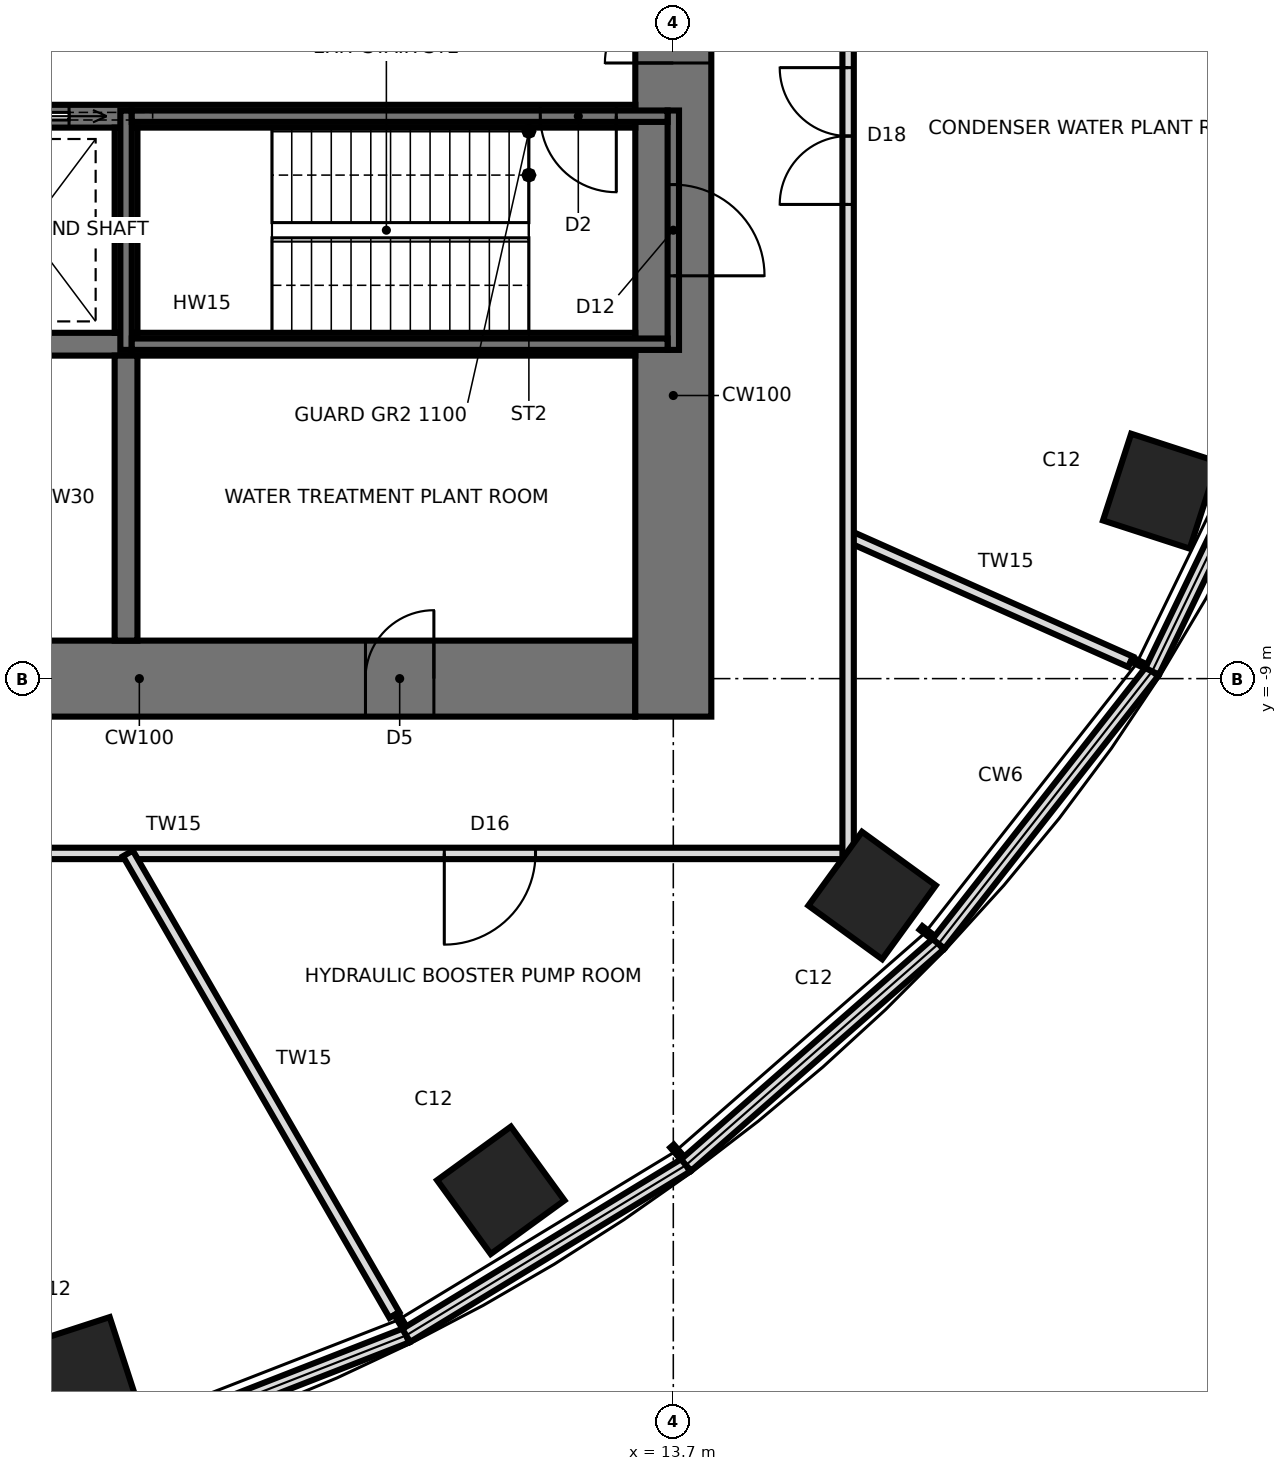
"""IFC4 building model, lengths in metres.
Left out: names, types, materials, properties, quantities, classifications, styles, units other than length and angle.
Written with IfcOpenShell. Run it as: python <this file> out.ifc"""

import sys

from ifc_helpers import new_model, si_unit, direction, frame, frame_2d, origin, origin_2d, place, context, subcontext, project, spatial, rectangle, extrude, element, fill, save


model = new_model("IFC4")
c1 = context("Model", 3, precision=1e-05, world=origin(), true_north=direction((0.0, 1.0)))
c2 = subcontext(c1, "Body", "Model", "MODEL_VIEW")
j1 = project(units=[si_unit("LENGTHUNIT", "METRE"), si_unit("PLANEANGLEUNIT", "RADIAN")], contexts=[c1])
p1 = place(None, origin())
s1 = spatial("IfcSite", under=j1, at=p1, CompositionType="ELEMENT")
p2 = place(p1, origin())
s2 = spatial("IfcBuilding", under=s1, at=p2, CompositionType="ELEMENT")
p3 = place(p2, frame((0.0, 0.0, 277.0)))
s3 = spatial("IfcBuildingStorey", under=s2, at=p3, CompositionType="ELEMENT", Elevation=277.0)
for number, where, z_axis, x_axis in (
    (1, (5.9, -18.157, 0.0), (0.0, 0.0, 1.0), (0.309, -0.951, 0.0)),
    (2, (11.43, -15.733, 0.0), (0.0, 0.0, 1.0), (0.588, -0.809, 0.0)),
    (3, (16.315, -11.854, 0.0), (0.0, 0.0, 1.0), (0.809, -0.588, 0.0)),
    (4, (20.109, -6.534, 0.0), (0.0, 0.0, 1.0), (0.951, -0.309, 0.0)),
):
    element("IfcColumn", number, at=place(p3, frame(where, z_axis=z_axis, x_axis=x_axis)), inside=s3, PredefinedType="COLUMN", context=c2, shape_type="SweptSolid", body=[
        extrude(rectangle(XDim=1.2, YDim=1.2, at=origin_2d()), origin(), (0.0, 0.0, 1.0), 5.0),
    ])
p4 = place(p3, frame((-13.2, -9.0, 0.0), z_axis=(0.0, 0.0, 1.0), x_axis=(1.0, 0.0, 0.0)))
e5 = element("IfcWall", 5, at=p4, inside=s3, PredefinedType="SHEAR", context=c2, shape_type="SweptSolid", body=[
    extrude(rectangle(XDim=26.4, YDim=1.0, at=frame_2d((13.2, 0.0))), origin(), (0.0, 0.0, 1.0), 5.0),
])
p5 = place(p4, frame((2.65, 0.0, 0.0)))
e6 = element("IfcOpeningElement", 6, at=p5, cuts=e5, PredefinedType="OPENING", context=c2, shape_type="SweptSolid", body=[
    extrude(rectangle(XDim=0.9, YDim=2.1, at=frame_2d((0.45, 1.05))), frame((0.0, 0.51, 0.0), z_axis=(0.0, -1.0, 0.0), x_axis=(1.0, 0.0, 0.0)), (0.0, 0.0, 1.0), 1.02),
])
p6 = place(p4, frame((9.5, 0.0, 0.0)))
e7 = element("IfcOpeningElement", 7, at=p6, cuts=e5, PredefinedType="OPENING", context=c2, shape_type="SweptSolid", body=[
    extrude(rectangle(XDim=0.9, YDim=2.1, at=frame_2d((0.45, 1.05))), frame((0.0, 0.51, 0.0), z_axis=(0.0, -1.0, 0.0), x_axis=(1.0, 0.0, 0.0)), (0.0, 0.0, 1.0), 1.02),
])
p7 = place(p4, frame((16.0, 0.0, 0.0)))
e8 = element("IfcOpeningElement", 8, at=p7, cuts=e5, PredefinedType="OPENING", context=c2, shape_type="SweptSolid", body=[
    extrude(rectangle(XDim=0.9, YDim=2.1, at=frame_2d((0.45, 1.05))), frame((0.0, 0.51, 0.0), z_axis=(0.0, -1.0, 0.0), x_axis=(1.0, 0.0, 0.0)), (0.0, 0.0, 1.0), 1.02),
])
p8 = place(p4, frame((22.85, 0.0, 0.0)))
e9 = element("IfcOpeningElement", 9, at=p8, cuts=e5, PredefinedType="OPENING", context=c2, shape_type="SweptSolid", body=[
    extrude(rectangle(XDim=0.9, YDim=2.1, at=frame_2d((0.45, 1.05))), frame((0.0, 0.51, 0.0), z_axis=(0.0, -1.0, 0.0), x_axis=(1.0, 0.0, 0.0)), (0.0, 0.0, 1.0), 1.02),
])
p9 = place(p3, frame((13.7, -9.5, 0.0), z_axis=(0.0, 0.0, 1.0), x_axis=(0.0, 1.0, 0.0)))
e10 = element("IfcWall", 10, at=p9, inside=s3, PredefinedType="SHEAR", context=c2, shape_type="SweptSolid", body=[
    extrude(rectangle(XDim=19.0, YDim=1.0, at=frame_2d((9.5, 0.0))), origin(), (0.0, 0.0, 1.0), 5.0),
])
p10 = place(p9, frame((8.6, 0.0, 0.0)))
e11 = element("IfcOpeningElement", 11, at=p10, cuts=e10, PredefinedType="OPENING", context=c2, shape_type="SweptSolid", body=[
    extrude(rectangle(XDim=1.8, YDim=2.4, at=frame_2d((0.9, 1.2))), frame((0.0, 0.51, 0.0), z_axis=(0.0, -1.0, 0.0), x_axis=(1.0, 0.0, 0.0)), (0.0, 0.0, 1.0), 1.02),
])
p11 = place(p3, frame((-13.2, -1.6, 0.0), z_axis=(0.0, 0.0, 1.0), x_axis=(1.0, 0.0, 0.0)))
e12 = element("IfcWall", 12, at=p11, inside=s3, PredefinedType="SHEAR", context=c2, shape_type="SweptSolid", body=[
    extrude(rectangle(XDim=26.4, YDim=0.3, at=frame_2d((13.2, 0.0))), origin(), (0.0, 0.0, 1.0), 5.0),
])
p12 = place(p11, frame((25.15, 0.0, 0.0)))
e13 = element("IfcOpeningElement", 13, at=p12, cuts=e12, PredefinedType="OPENING", context=c2, shape_type="SweptSolid", body=[
    extrude(rectangle(XDim=1.0, YDim=2.1, at=frame_2d((0.5, 1.05))), frame((0.0, 0.16, 0.0), z_axis=(0.0, -1.0, 0.0), x_axis=(1.0, 0.0, 0.0)), (0.0, 0.0, 1.0), 0.32),
])
p13 = place(p11, frame((7.55, 0.0, 0.0)))
e14 = element("IfcOpeningElement", 14, at=p13, cuts=e12, PredefinedType="OPENING", context=c2, shape_type="SweptSolid", body=[
    extrude(rectangle(XDim=0.9, YDim=2.1, at=frame_2d((0.45, 1.05))), frame((0.0, 0.16, 0.0), z_axis=(0.0, -1.0, 0.0), x_axis=(1.0, 0.0, 0.0)), (0.0, 0.0, 1.0), 0.32),
])
p14 = place(p11, frame((10.15, 0.0, 0.0)))
e15 = element("IfcOpeningElement", 15, at=p14, cuts=e12, PredefinedType="OPENING", context=c2, shape_type="SweptSolid", body=[
    extrude(rectangle(XDim=0.9, YDim=2.1, at=frame_2d((0.45, 1.05))), frame((0.0, 0.16, 0.0), z_axis=(0.0, -1.0, 0.0), x_axis=(1.0, 0.0, 0.0)), (0.0, 0.0, 1.0), 0.32),
])
p15 = place(p11, frame((12.75, 0.0, 0.0)))
e16 = element("IfcOpeningElement", 16, at=p15, cuts=e12, PredefinedType="OPENING", context=c2, shape_type="SweptSolid", body=[
    extrude(rectangle(XDim=0.9, YDim=2.1, at=frame_2d((0.45, 1.05))), frame((0.0, 0.16, 0.0), z_axis=(0.0, -1.0, 0.0), x_axis=(1.0, 0.0, 0.0)), (0.0, 0.0, 1.0), 0.32),
])
p16 = place(p11, frame((15.25, 0.0, 0.0)))
e17 = element("IfcOpeningElement", 17, at=p16, cuts=e12, PredefinedType="OPENING", context=c2, shape_type="SweptSolid", body=[
    extrude(rectangle(XDim=1.1, YDim=2.3, at=frame_2d((0.55, 1.15))), frame((0.0, 0.16, 0.0), z_axis=(0.0, -1.0, 0.0), x_axis=(1.0, 0.0, 0.0)), (0.0, 0.0, 1.0), 0.32),
])
p17 = place(p11, frame((17.85, 0.0, 0.0)))
e18 = element("IfcOpeningElement", 18, at=p17, cuts=e12, PredefinedType="OPENING", context=c2, shape_type="SweptSolid", body=[
    extrude(rectangle(XDim=1.1, YDim=2.3, at=frame_2d((0.55, 1.15))), frame((0.0, 0.16, 0.0), z_axis=(0.0, -1.0, 0.0), x_axis=(1.0, 0.0, 0.0)), (0.0, 0.0, 1.0), 0.32),
])
p18 = place(p11, frame((5.55, 0.0, 0.0)))
e19 = element("IfcOpeningElement", 19, at=p18, cuts=e12, PredefinedType="OPENING", context=c2, shape_type="SweptSolid", body=[
    extrude(rectangle(XDim=0.9, YDim=2.1, at=frame_2d((0.45, 1.05))), frame((0.0, 0.16, 0.0), z_axis=(0.0, -1.0, 0.0), x_axis=(1.0, 0.0, 0.0)), (0.0, 0.0, 1.0), 0.32),
])
p19 = place(p3, frame((-13.2, -4.6, 0.0), z_axis=(0.0, 0.0, 1.0), x_axis=(1.0, 0.0, 0.0)))
e20 = element("IfcWall", 20, at=p19, inside=s3, PredefinedType="SHEAR", context=c2, shape_type="SweptSolid", body=[
    extrude(rectangle(XDim=26.4, YDim=0.3, at=frame_2d((13.2, 0.0))), origin(), (0.0, 0.0, 1.0), 5.0),
])
p20 = place(p3, frame((6.5, -1.75, 0.0), z_axis=(0.0, 0.0, 1.0), x_axis=(0.0, -1.0, 0.0)))
e21 = element("IfcWall", 21, at=p20, inside=s3, PredefinedType="SHEAR", context=c2, shape_type="SweptSolid", body=[
    extrude(rectangle(XDim=2.7, YDim=0.3, at=frame_2d((1.35, 0.0))), origin(), (0.0, 0.0, 1.0), 5.0),
])
p21 = place(p3, frame((6.5, -4.75, 0.0), z_axis=(0.0, 0.0, 1.0), x_axis=(0.0, -1.0, 0.0)))
e22 = element("IfcWall", 22, at=p21, inside=s3, PredefinedType="SHEAR", context=c2, shape_type="SweptSolid", body=[
    extrude(rectangle(XDim=3.75, YDim=0.3, at=frame_2d((1.875, 0.0))), origin(), (0.0, 0.0, 1.0), 5.0),
])
p22 = place(p3, frame((6.233, -19.184, 5.0), z_axis=(0.0, 0.0, 1.0), x_axis=(0.931602336342, 0.363479142348, 0.0)))
e23 = element("IfcWall", 23, at=p22, inside=s3, PredefinedType="PARAPET", context=c2, shape_type="SweptSolid", body=[
    extrude(rectangle(XDim=4.242, YDim=0.2, at=frame_2d((2.121, 0.0))), origin(), (0.0, 0.0, 1.0), 0.4),
])
p23 = place(p3, frame((10.186, -17.642, 5.0), z_axis=(0.0, 0.0, 1.0), x_axis=(0.854217149251, 0.519916398977, 0.0)))
e24 = element("IfcWall", 24, at=p23, inside=s3, PredefinedType="PARAPET", context=c2, shape_type="SweptSolid", body=[
    extrude(rectangle(XDim=4.31, YDim=0.2, at=frame_2d((2.155, 0.0))), origin(), (0.0, 0.0, 1.0), 0.4),
])
p24 = place(p3, frame((13.867, -15.401, 5.0), z_axis=(0.0, 0.0, 1.0), x_axis=(0.751898477354, 0.659278908925, 0.0)))
e25 = element("IfcWall", 25, at=p24, inside=s3, PredefinedType="PARAPET", context=c2, shape_type="SweptSolid", body=[
    extrude(rectangle(XDim=4.418, YDim=0.2, at=frame_2d((2.209, 0.0))), origin(), (0.0, 0.0, 1.0), 0.4),
])
p25 = place(p3, frame((17.189, -12.489, 5.0), z_axis=(0.0, 0.0, 1.0), x_axis=(0.617115858167, 0.786872300694, 0.0)))
e26 = element("IfcWall", 26, at=p25, inside=s3, PredefinedType="PARAPET", context=c2, shape_type="SweptSolid", body=[
    extrude(rectangle(XDim=4.555, YDim=0.2, at=frame_2d((2.277, 0.0))), origin(), (0.0, 0.0, 1.0), 0.4),
])
p26 = place(p3, frame((20.0, -8.905, 5.0), z_axis=(0.0, 0.0, 1.0), x_axis=(0.43525592316, 0.900306770692, 0.0)))
e27 = element("IfcWall", 27, at=p26, inside=s3, PredefinedType="PARAPET", context=c2, shape_type="SweptSolid", body=[
    extrude(rectangle(XDim=4.687, YDim=0.2, at=frame_2d((2.344, 0.0))), origin(), (0.0, 0.0, 1.0), 0.4),
])
p27 = place(p3, frame((-16.0, -11.3, 0.0), z_axis=(0.0, 0.0, 1.0), x_axis=(1.0, 0.0, 0.0)))
e28 = element("IfcWall", 28, at=p27, inside=s3, PredefinedType="PARTITIONING", context=c2, shape_type="SweptSolid", body=[
    extrude(rectangle(XDim=32.0, YDim=0.15, at=frame_2d((16.0, 0.0))), origin(), (0.0, 0.0, 1.0), 4.75),
])
p28 = place(p27, frame((2.313, 0.0, 0.0)))
e29 = element("IfcOpeningElement", 29, at=p28, cuts=e28, PredefinedType="OPENING", context=c2, shape_type="SweptSolid", body=[
    extrude(rectangle(XDim=1.2, YDim=2.1, at=frame_2d((0.6, 1.05))), frame((0.0, 0.085, 0.0), z_axis=(0.0, -1.0, 0.0), x_axis=(1.0, 0.0, 0.0)), (0.0, 0.0, 1.0), 0.17),
])
p29 = place(p27, frame((9.394, 0.0, 0.0)))
e30 = element("IfcOpeningElement", 30, at=p29, cuts=e28, PredefinedType="OPENING", context=c2, shape_type="SweptSolid", body=[
    extrude(rectangle(XDim=1.8, YDim=2.4, at=frame_2d((0.9, 1.2))), frame((0.0, 0.085, 0.0), z_axis=(0.0, -1.0, 0.0), x_axis=(1.0, 0.0, 0.0)), (0.0, 0.0, 1.0), 0.17),
])
p30 = place(p27, frame((17.768, 0.0, 0.0)))
e31 = element("IfcOpeningElement", 31, at=p30, cuts=e28, PredefinedType="OPENING", context=c2, shape_type="SweptSolid", body=[
    extrude(rectangle(XDim=1.8, YDim=2.4, at=frame_2d((0.9, 1.2))), frame((0.0, 0.085, 0.0), z_axis=(0.0, -1.0, 0.0), x_axis=(1.0, 0.0, 0.0)), (0.0, 0.0, 1.0), 0.17),
])
p31 = place(p27, frame((26.687, 0.0, 0.0)))
e32 = element("IfcOpeningElement", 32, at=p31, cuts=e28, PredefinedType="OPENING", context=c2, shape_type="SweptSolid", body=[
    extrude(rectangle(XDim=1.2, YDim=2.1, at=frame_2d((0.6, 1.05))), frame((0.0, 0.085, 0.0), z_axis=(0.0, -1.0, 0.0), x_axis=(1.0, 0.0, 0.0)), (0.0, 0.0, 1.0), 0.17),
])
p32 = place(p3, frame((6.524, -11.3, 0.0), z_axis=(0.0, 0.0, 1.0), x_axis=(0.4999806097, -0.86603659849, 0.0)))
e33 = element("IfcWall", 33, at=p32, inside=s3, PredefinedType="PARTITIONING", context=c2, shape_type="SweptSolid", body=[
    extrude(rectangle(XDim=7.013, YDim=0.15, at=frame_2d((3.506, 0.0))), origin(), (0.0, 0.0, 1.0), 4.75),
])
p33 = place(p3, frame((16.0, -7.124, 0.0), z_axis=(0.0, 0.0, 1.0), x_axis=(0.91357135451, -0.406678472774, 0.0)))
e34 = element("IfcWall", 34, at=p33, inside=s3, PredefinedType="PARTITIONING", context=c2, shape_type="SweptSolid", body=[
    extrude(rectangle(XDim=4.068, YDim=0.15, at=frame_2d((2.034, 0.0))), origin(), (0.0, 0.0, 1.0), 4.75),
])
p34 = place(p3, frame((16.0, -11.3, 0.0), z_axis=(0.0, 0.0, 1.0), x_axis=(0.0, 1.0, 0.0)))
e35 = element("IfcWall", 35, at=p34, inside=s3, PredefinedType="PARTITIONING", context=c2, shape_type="SweptSolid", body=[
    extrude(rectangle(XDim=22.6, YDim=0.15, at=frame_2d((11.3, 0.0))), origin(), (0.0, 0.0, 1.0), 4.75),
])
p35 = place(p34, frame((8.539, 0.0, 0.0)))
e36 = element("IfcOpeningElement", 36, at=p35, cuts=e35, PredefinedType="OPENING", context=c2, shape_type="SweptSolid", body=[
    extrude(rectangle(XDim=1.8, YDim=2.4, at=frame_2d((0.9, 1.2))), frame((0.0, 0.085, 0.0), z_axis=(0.0, -1.0, 0.0), x_axis=(1.0, 0.0, 0.0)), (0.0, 0.0, 1.0), 0.17),
])
p36 = place(p3, frame((6.5, -4.675, 5.0), z_axis=(0.0, 0.0, 1.0), x_axis=(0.0, 1.0, 0.0)))
e37 = element("IfcWall", 37, at=p36, inside=s3, PredefinedType="SOLIDWALL", context=c2, shape_type="SweptSolid", body=[
    extrude(rectangle(XDim=3.15, YDim=0.15, at=frame_2d((1.575, 0.0))), origin(), (0.0, 0.0, 1.0), 2.82),
])
p37 = place(p3, frame((13.7, -4.675, 5.0), z_axis=(0.0, 0.0, 1.0), x_axis=(0.0, 1.0, 0.0)))
e38 = element("IfcWall", 38, at=p37, inside=s3, PredefinedType="SOLIDWALL", context=c2, shape_type="SweptSolid", body=[
    extrude(rectangle(XDim=3.15, YDim=0.15, at=frame_2d((1.575, 0.0))), origin(), (0.0, 0.0, 1.0), 2.82),
])
p38 = place(p37, frame((0.975, 0.0, 0.0)))
e39 = element("IfcOpeningElement", 39, at=p38, cuts=e38, PredefinedType="OPENING", context=c2, shape_type="SweptSolid", body=[
    extrude(rectangle(XDim=1.2, YDim=2.1, at=frame_2d((0.6, 1.05))), frame((0.0, 0.085, 0.0), z_axis=(0.0, -1.0, 0.0), x_axis=(1.0, 0.0, 0.0)), (0.0, 0.0, 1.0), 0.17),
])
p39 = place(p3, frame((6.575, -4.6, 5.0), z_axis=(0.0, 0.0, 1.0), x_axis=(1.0, 0.0, 0.0)))
e40 = element("IfcWall", 40, at=p39, inside=s3, PredefinedType="SOLIDWALL", context=c2, shape_type="SweptSolid", body=[
    extrude(rectangle(XDim=7.05, YDim=0.15, at=frame_2d((3.525, 0.0))), origin(), (0.0, 0.0, 1.0), 2.82),
])
p40 = place(p3, frame((6.575, -1.6, 5.0), z_axis=(0.0, 0.0, 1.0), x_axis=(1.0, 0.0, 0.0)))
e41 = element("IfcWall", 41, at=p40, inside=s3, PredefinedType="SOLIDWALL", context=c2, shape_type="SweptSolid", body=[
    extrude(rectangle(XDim=7.05, YDim=0.15, at=frame_2d((3.525, 0.0))), origin(), (0.0, 0.0, 1.0), 2.82),
])
p41 = place(p40, frame((0.5, 0.0, 1.9)))
e42 = element("IfcOpeningElement", 42, at=p41, cuts=e41, PredefinedType="OPENING", context=c2, shape_type="SweptSolid", body=[
    extrude(rectangle(XDim=0.9, YDim=0.6, at=frame_2d((0.45, 0.3))), frame((0.0, 0.085, 0.0), z_axis=(0.0, -1.0, 0.0), x_axis=(1.0, 0.0, 0.0)), (0.0, 0.0, 1.0), 0.17),
])
p42 = place(p10, origin())
e43 = element("IfcDoor", 43, at=p42, inside=s3, OperationType="DOUBLE_DOOR_SINGLE_SWING", PredefinedType="DOOR", context=c2, shape_type="SweptSolid", body=[
    extrude(rectangle(XDim=1.72, YDim=2.36, at=frame_2d((0.9, 1.18))), frame((0.0, 0.025, 0.0), z_axis=(0.0, -1.0, 0.0), x_axis=(1.0, 0.0, 0.0)), (0.0, 0.0, 1.0), 0.05),
    extrude(rectangle(XDim=0.04, YDim=2.4, at=frame_2d((0.02, 1.2))), frame((0.0, 0.25, 0.0), z_axis=(0.0, -1.0, 0.0), x_axis=(1.0, 0.0, 0.0)), (0.0, 0.0, 1.0), 0.5),
    extrude(rectangle(XDim=0.04, YDim=2.4, at=frame_2d((1.78, 1.2))), frame((0.0, 0.25, 0.0), z_axis=(0.0, -1.0, 0.0), x_axis=(1.0, 0.0, 0.0)), (0.0, 0.0, 1.0), 0.5),
    extrude(rectangle(XDim=1.72, YDim=0.04, at=frame_2d((0.9, 2.38))), frame((0.0, 0.25, 0.0), z_axis=(0.0, -1.0, 0.0), x_axis=(1.0, 0.0, 0.0)), (0.0, 0.0, 1.0), 0.5),
])
fill(e11, e43)
p43 = place(p12, frame((1.0, 0.0, 0.0), z_axis=(0.0, 0.0, 1.0), x_axis=(-1.0, 0.0, 0.0)))
e44 = element("IfcDoor", 44, at=p43, inside=s3, OperationType="SINGLE_SWING_LEFT", PredefinedType="DOOR", context=c2, shape_type="SweptSolid", body=[
    extrude(rectangle(XDim=1.0, YDim=2.1, at=frame_2d((0.5, 1.05))), frame((0.0, 0.025, 0.0), z_axis=(0.0, -1.0, 0.0), x_axis=(1.0, 0.0, 0.0)), (0.0, 0.0, 1.0), 0.05),
])
fill(e13, e44)
p44 = place(p17, frame((1.1, 0.0, 0.0), z_axis=(0.0, 0.0, 1.0), x_axis=(-1.0, 0.0, 0.0)))
e45 = element("IfcDoor", 45, at=p44, inside=s3, OperationType="SLIDING_TO_LEFT", PredefinedType="DOOR", context=c2, shape_type="SweptSolid", body=[
    extrude(rectangle(XDim=1.1, YDim=2.3, at=frame_2d((0.55, 1.15))), frame((0.0, 0.025, 0.0), z_axis=(0.0, -1.0, 0.0), x_axis=(1.0, 0.0, 0.0)), (0.0, 0.0, 1.0), 0.05),
])
fill(e18, e45)
p45 = place(p8, origin())
e46 = element("IfcDoor", 46, at=p45, inside=s3, OperationType="SINGLE_SWING_RIGHT", PredefinedType="DOOR", context=c2, shape_type="SweptSolid", body=[
    extrude(rectangle(XDim=0.82, YDim=2.06, at=frame_2d((0.45, 1.03))), frame((0.0, 0.025, 0.0), z_axis=(0.0, -1.0, 0.0), x_axis=(1.0, 0.0, 0.0)), (0.0, 0.0, 1.0), 0.05),
    extrude(rectangle(XDim=0.04, YDim=2.1, at=frame_2d((0.02, 1.05))), frame((0.0, 0.25, 0.0), z_axis=(0.0, -1.0, 0.0), x_axis=(1.0, 0.0, 0.0)), (0.0, 0.0, 1.0), 0.5),
    extrude(rectangle(XDim=0.04, YDim=2.1, at=frame_2d((0.88, 1.05))), frame((0.0, 0.25, 0.0), z_axis=(0.0, -1.0, 0.0), x_axis=(1.0, 0.0, 0.0)), (0.0, 0.0, 1.0), 0.5),
    extrude(rectangle(XDim=0.82, YDim=0.04, at=frame_2d((0.45, 2.08))), frame((0.0, 0.25, 0.0), z_axis=(0.0, -1.0, 0.0), x_axis=(1.0, 0.0, 0.0)), (0.0, 0.0, 1.0), 0.5),
])
fill(e9, e46)
p46 = place(p31, frame((1.2, 0.0, 0.0), z_axis=(0.0, 0.0, 1.0), x_axis=(-1.0, 0.0, 0.0)))
e47 = element("IfcDoor", 47, at=p46, inside=s3, OperationType="SINGLE_SWING_RIGHT", PredefinedType="DOOR", context=c2, shape_type="SweptSolid", body=[
    extrude(rectangle(XDim=1.2, YDim=2.1, at=frame_2d((0.6, 1.05))), frame((0.0, 0.025, 0.0), z_axis=(0.0, -1.0, 0.0), x_axis=(1.0, 0.0, 0.0)), (0.0, 0.0, 1.0), 0.05),
])
fill(e32, e47)
p47 = place(p35, origin())
e48 = element("IfcDoor", 48, at=p47, inside=s3, OperationType="DOUBLE_DOOR_SINGLE_SWING", PredefinedType="DOOR", context=c2, shape_type="SweptSolid", body=[
    extrude(rectangle(XDim=1.8, YDim=2.4, at=frame_2d((0.9, 1.2))), frame((0.0, 0.025, 0.0), z_axis=(0.0, -1.0, 0.0), x_axis=(1.0, 0.0, 0.0)), (0.0, 0.0, 1.0), 0.05),
])
fill(e36, e48)
p48 = place(p38, frame((1.2, 0.0, 0.0), z_axis=(0.0, 0.0, 1.0), x_axis=(-1.0, 0.0, 0.0)))
e49 = element("IfcDoor", 49, at=p48, inside=s3, OperationType="SINGLE_SWING_RIGHT", PredefinedType="DOOR", context=c2, shape_type="SweptSolid", body=[
    extrude(rectangle(XDim=1.2, YDim=2.1, at=frame_2d((0.6, 1.05))), frame((0.0, 0.025, 0.0), z_axis=(0.0, -1.0, 0.0), x_axis=(1.0, 0.0, 0.0)), (0.0, 0.0, 1.0), 0.05),
])
fill(e39, e49)
save(model, sys.argv[1])
